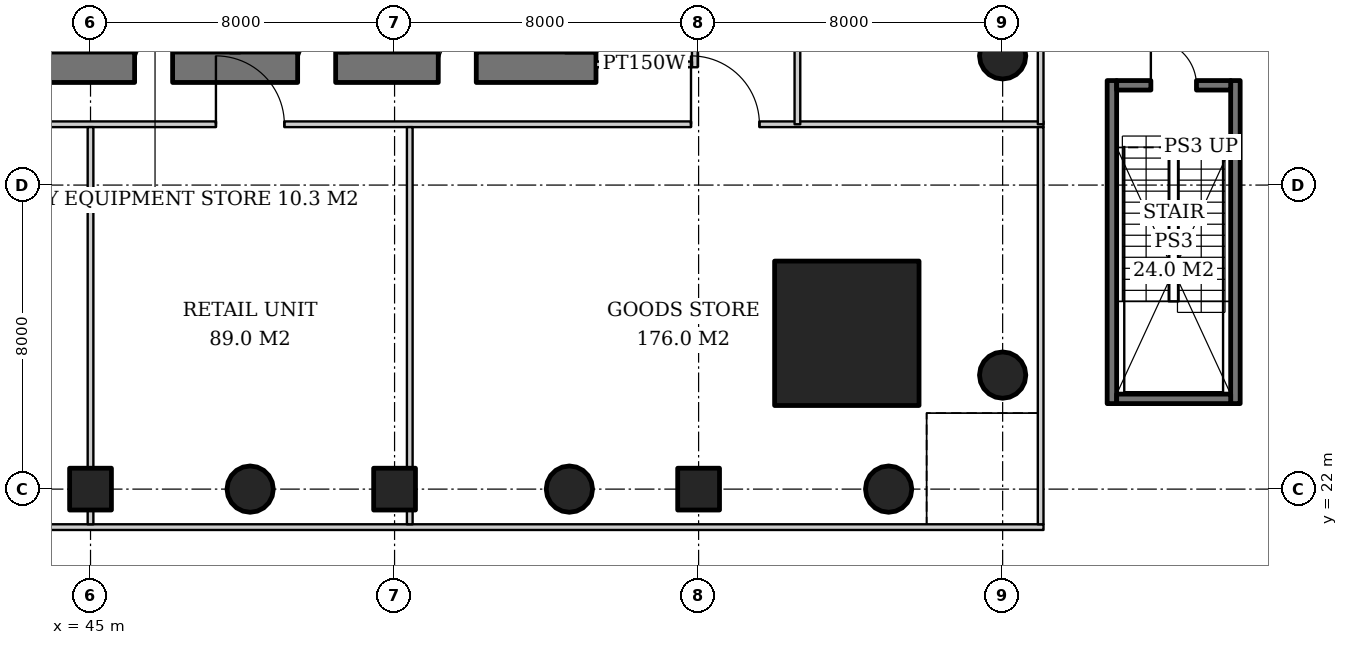
"""IFC4 building model, lengths in metres.
Left out: names, types, materials, properties, quantities, classifications, styles, units other than length and angle.
Written with IfcOpenShell. Run it as: python <this file> out.ifc"""

import sys

from ifc_helpers import new_model, si_unit, direction, frame, frame_2d, origin, origin_2d, place, context, subcontext, project, spatial, rectangle, hollow_circle, extrude, element, fill, save


model = new_model("IFC4")
c1 = context("Model", 3, precision=1e-05, world=origin(), true_north=direction((0.0, 1.0)))
c2 = subcontext(c1, "Body", "Model", "MODEL_VIEW")
j1 = project(units=[si_unit("LENGTHUNIT", "METRE"), si_unit("PLANEANGLEUNIT", "RADIAN")], contexts=[c1])
p1 = place(None, origin())
s1 = spatial("IfcSite", under=j1, at=p1, CompositionType="ELEMENT")
p2 = place(p1, origin())
s2 = spatial("IfcBuilding", under=s1, at=p2, CompositionType="ELEMENT")
p3 = place(p2, frame((0.0, 0.0, 6.0)))
s3 = spatial("IfcBuildingStorey", under=s2, at=p3, CompositionType="ELEMENT", Elevation=6.0)
for number, where, z_axis, x_axis in (
    (1, (69.0, 25.0, 0.0), (0.0, 0.0, 1.0), (1.0, 0.0, 0.0)),
    (2, (69.0, 33.4, 0.0), (0.0, 0.0, 1.0), (1.0, 0.0, 0.0)),
):
    element("IfcColumn", number, at=place(p3, frame(where, z_axis=z_axis, x_axis=x_axis)), inside=s3, PredefinedType="COLUMN", context=c2, shape_type="SweptSolid", body=[
        extrude(hollow_circle(Radius=0.61, WallThickness=0.04, at=origin_2d()), origin(), (0.0, 0.0, 1.0), 5.0),
    ])
p4 = place(p3, frame((64.9, 26.1, 0.0), z_axis=(0.0, 0.0, 1.0), x_axis=(1.0, 0.0, 0.0)))
e3 = element("IfcColumn", 3, at=p4, inside=s3, PredefinedType="COLUMN", context=c2, shape_type="SweptSolid", body=[
    extrude(rectangle(XDim=3.8, YDim=3.8, at=origin_2d()), origin(), (0.0, 0.0, 1.0), 5.0),
])
for number, where, z_axis, x_axis in (
    (4, (66.0, 22.0, 0.0), (0.0, 0.0, 1.0), (1.0, 0.0, 0.0)),
    (5, (49.2, 22.0, 0.0), (0.0, 0.0, 1.0), (1.0, 0.0, 0.0)),
    (6, (57.6, 22.0, 0.0), (0.0, 0.0, 1.0), (1.0, 0.0, 0.0)),
):
    element("IfcColumn", number, at=place(p3, frame(where, z_axis=z_axis, x_axis=x_axis)), inside=s3, PredefinedType="COLUMN", context=c2, shape_type="SweptSolid", body=[
        extrude(hollow_circle(Radius=0.61, WallThickness=0.04, at=origin_2d()), origin(), (0.0, 0.0, 1.0), 5.0),
    ])
p5 = place(p3, frame((31.7, 33.1, 0.0), z_axis=(0.0, 0.0, 1.0), x_axis=(1.0, 0.0, 0.0)))
e7 = element("IfcWall", 7, at=p5, inside=s3, PredefinedType="SHEAR", context=c2, shape_type="SweptSolid", body=[
    extrude(rectangle(XDim=26.6, YDim=0.8, at=frame_2d((13.3, 0.0))), origin(), (0.0, 0.0, 1.0), 5.0),
])
p6 = place(p5, frame((7.3, 0.0, 0.0)))
e8 = element("IfcOpeningElement", 8, at=p6, cuts=e7, PredefinedType="OPENING", context=c2, shape_type="SweptSolid", body=[
    extrude(rectangle(XDim=1.0, YDim=2.1, at=frame_2d((0.5, 1.05))), frame((0.0, 0.41, 0.0), z_axis=(0.0, -1.0, 0.0), x_axis=(1.0, 0.0, 0.0)), (0.0, 0.0, 1.0), 0.82),
])
p7 = place(p5, frame((18.75, 0.0, 0.0)))
e9 = element("IfcOpeningElement", 9, at=p7, cuts=e7, PredefinedType="OPENING", context=c2, shape_type="SweptSolid", body=[
    extrude(rectangle(XDim=1.0, YDim=2.1, at=frame_2d((0.5, 1.05))), frame((0.0, 0.41, 0.0), z_axis=(0.0, -1.0, 0.0), x_axis=(1.0, 0.0, 0.0)), (0.0, 0.0, 1.0), 0.82),
])
p8 = place(p5, frame((3.25, 0.0, 0.0)))
e10 = element("IfcOpeningElement", 10, at=p8, cuts=e7, PredefinedType="OPENING", context=c2, shape_type="SweptSolid", body=[
    extrude(rectangle(XDim=1.0, YDim=2.1, at=frame_2d((0.5, 1.05))), frame((0.0, 0.41, 0.0), z_axis=(0.0, -1.0, 0.0), x_axis=(1.0, 0.0, 0.0)), (0.0, 0.0, 1.0), 0.82),
])
p9 = place(p5, frame((10.42, 0.0, 0.0)))
e11 = element("IfcOpeningElement", 11, at=p9, cuts=e7, PredefinedType="OPENING", context=c2, shape_type="SweptSolid", body=[
    extrude(rectangle(XDim=1.0, YDim=2.1, at=frame_2d((0.5, 1.05))), frame((0.0, 0.41, 0.0), z_axis=(0.0, -1.0, 0.0), x_axis=(1.0, 0.0, 0.0)), (0.0, 0.0, 1.0), 0.82),
])
p10 = place(p5, frame((14.46, 0.0, 0.0)))
e12 = element("IfcOpeningElement", 12, at=p10, cuts=e7, PredefinedType="OPENING", context=c2, shape_type="SweptSolid", body=[
    extrude(rectangle(XDim=1.0, YDim=2.1, at=frame_2d((0.5, 1.05))), frame((0.0, 0.41, 0.0), z_axis=(0.0, -1.0, 0.0), x_axis=(1.0, 0.0, 0.0)), (0.0, 0.0, 1.0), 0.82),
])
p11 = place(p5, frame((22.45, 0.0, 0.0)))
e13 = element("IfcOpeningElement", 13, at=p11, cuts=e7, PredefinedType="OPENING", context=c2, shape_type="SweptSolid", body=[
    extrude(rectangle(XDim=1.0, YDim=2.1, at=frame_2d((0.5, 1.05))), frame((0.0, 0.41, 0.0), z_axis=(0.0, -1.0, 0.0), x_axis=(1.0, 0.0, 0.0)), (0.0, 0.0, 1.0), 0.82),
])
for number, where, z_axis, x_axis in (
    (14, (45.0, 22.0, 0.0), (0.0, 0.0, 1.0), (1.0, 0.0, 0.0)),
    (15, (53.0, 22.0, 0.0), (0.0, 0.0, 1.0), (1.0, 0.0, 0.0)),
    (16, (61.0, 22.0, 0.0), (0.0, 0.0, 1.0), (1.0, 0.0, 0.0)),
):
    element("IfcColumn", number, at=place(p3, frame(where, z_axis=z_axis, x_axis=x_axis)), inside=s3, PredefinedType="COLUMN", context=c2, shape_type="SweptSolid", body=[
        extrude(rectangle(XDim=1.1, YDim=1.1, at=origin_2d()), origin(), (0.0, 0.0, 1.0), 5.0),
    ])
for number, where, z_axis, x_axis in (
    (17, (71.875, 24.25, 0.0), (0.0, 0.0, 1.0), (0.0, 1.0, 0.0)),
    (18, (75.125, 24.25, 0.0), (0.0, 0.0, 1.0), (0.0, 1.0, 0.0)),
):
    element("IfcWall", number, at=place(p3, frame(where, z_axis=z_axis, x_axis=x_axis)), inside=s3, PredefinedType="SOLIDWALL", context=c2, shape_type="SweptSolid", body=[
        extrude(rectangle(XDim=8.5, YDim=0.25, at=frame_2d((4.25, 0.0))), origin(), (0.0, 0.0, 1.0), 4.7),
    ])
p12 = place(p3, frame((72.0, 24.375, 0.0), z_axis=(0.0, 0.0, 1.0), x_axis=(1.0, 0.0, 0.0)))
e19 = element("IfcWall", 19, at=p12, inside=s3, PredefinedType="SOLIDWALL", context=c2, shape_type="SweptSolid", body=[
    extrude(rectangle(XDim=3.0, YDim=0.25, at=frame_2d((1.5, 0.0))), origin(), (0.0, 0.0, 1.0), 4.7),
])
p13 = place(p3, frame((72.0, 32.625, 0.0), z_axis=(0.0, 0.0, 1.0), x_axis=(1.0, 0.0, 0.0)))
e20 = element("IfcWall", 20, at=p13, inside=s3, PredefinedType="SOLIDWALL", context=c2, shape_type="SweptSolid", body=[
    extrude(rectangle(XDim=3.0, YDim=0.25, at=frame_2d((1.5, 0.0))), origin(), (0.0, 0.0, 1.0), 4.7),
])
p14 = place(p13, frame((0.9, 0.0, 0.0)))
e21 = element("IfcOpeningElement", 21, at=p14, cuts=e20, PredefinedType="OPENING", context=c2, shape_type="SweptSolid", body=[
    extrude(rectangle(XDim=1.2, YDim=2.1, at=frame_2d((0.6, 1.05))), frame((0.0, 0.135, 0.0), z_axis=(0.0, -1.0, 0.0), x_axis=(1.0, 0.0, 0.0)), (0.0, 0.0, 1.0), 0.27),
])
p15 = place(p3, frame((60.9, 33.1, 0.0), z_axis=(0.0, 0.0, 1.0), x_axis=(0.0, 1.0, 0.0)))
e22 = element("IfcWall", 22, at=p15, inside=s3, PredefinedType="PARTITIONING", context=c2, shape_type="SweptSolid", body=[
    extrude(rectangle(XDim=10.8, YDim=0.15, at=frame_2d((5.4, 0.0))), origin(), (0.0, 0.0, 1.0), 3.688),
])
p16 = place(p15, frame((1.738, 0.0, 0.0)))
e23 = element("IfcOpeningElement", 23, at=p16, cuts=e22, PredefinedType="OPENING", context=c2, shape_type="SweptSolid", body=[
    extrude(rectangle(XDim=0.8, YDim=2.1, at=frame_2d((0.4, 1.05))), frame((0.0, 0.085, 0.0), z_axis=(0.0, -1.0, 0.0), x_axis=(1.0, 0.0, 0.0)), (0.0, 0.0, 1.0), 0.17),
])
p17 = place(p15, frame((4.9, 0.0, 0.0)))
e24 = element("IfcOpeningElement", 24, at=p17, cuts=e22, PredefinedType="OPENING", context=c2, shape_type="SweptSolid", body=[
    extrude(rectangle(XDim=1.0, YDim=2.1, at=frame_2d((0.5, 1.05))), frame((0.0, 0.085, 0.0), z_axis=(0.0, -1.0, 0.0), x_axis=(1.0, 0.0, 0.0)), (0.0, 0.0, 1.0), 0.17),
])
p18 = place(p15, frame((8.262, 0.0, 0.0)))
e25 = element("IfcOpeningElement", 25, at=p18, cuts=e22, PredefinedType="OPENING", context=c2, shape_type="SweptSolid", body=[
    extrude(rectangle(XDim=0.8, YDim=2.1, at=frame_2d((0.4, 1.05))), frame((0.0, 0.085, 0.0), z_axis=(0.0, -1.0, 0.0), x_axis=(1.0, 0.0, 0.0)), (0.0, 0.0, 1.0), 0.17),
])
p19 = place(p3, frame((60.825, 33.175, 0.0), z_axis=(0.0, 0.0, 1.0), x_axis=(-1.0, 0.0, 0.0)))
e26 = element("IfcWall", 26, at=p19, inside=s3, PredefinedType="PARTITIONING", context=c2, shape_type="SweptSolid", body=[
    extrude(rectangle(XDim=2.525, YDim=0.15, at=frame_2d((1.262, 0.0))), origin(), (0.0, 0.0, 1.0), 3.688),
])
p20 = place(p3, frame((19.925, 21.0, 0.0), z_axis=(0.0, 0.0, 1.0), x_axis=(1.0, 0.0, 0.0)))
e27 = element("IfcWall", 27, at=p20, inside=s3, PredefinedType="PARTITIONING", context=c2, shape_type="SweptSolid", body=[
    extrude(rectangle(XDim=50.15, YDim=0.15, at=frame_2d((25.075, 0.0))), origin(), (0.0, 0.0, 1.0), 3.2),
])
p21 = place(p3, frame((19.925, 31.6, 0.0), z_axis=(0.0, 0.0, 1.0), x_axis=(1.0, 0.0, 0.0)))
e28 = element("IfcWall", 28, at=p21, inside=s3, PredefinedType="PARTITIONING", context=c2, shape_type="SweptSolid", body=[
    extrude(rectangle(XDim=50.15, YDim=0.15, at=frame_2d((25.075, 0.0))), origin(), (0.0, 0.0, 1.0), 3.688),
])
p22 = place(p21, frame((7.475, 0.0, 0.0)))
e29 = element("IfcOpeningElement", 29, at=p22, cuts=e28, PredefinedType="OPENING", context=c2, shape_type="SweptSolid", body=[
    extrude(rectangle(XDim=1.8, YDim=2.4, at=frame_2d((0.9, 1.2))), frame((0.0, 0.085, 0.0), z_axis=(0.0, -1.0, 0.0), x_axis=(1.0, 0.0, 0.0)), (0.0, 0.0, 1.0), 0.17),
])
p23 = place(p21, frame((19.975, 0.0, 0.0)))
e30 = element("IfcOpeningElement", 30, at=p23, cuts=e28, PredefinedType="OPENING", context=c2, shape_type="SweptSolid", body=[
    extrude(rectangle(XDim=1.8, YDim=2.4, at=frame_2d((0.9, 1.2))), frame((0.0, 0.085, 0.0), z_axis=(0.0, -1.0, 0.0), x_axis=(1.0, 0.0, 0.0)), (0.0, 0.0, 1.0), 0.17),
])
p24 = place(p21, frame((28.375, 0.0, 0.0)))
e31 = element("IfcOpeningElement", 31, at=p24, cuts=e28, PredefinedType="OPENING", context=c2, shape_type="SweptSolid", body=[
    extrude(rectangle(XDim=1.8, YDim=2.4, at=frame_2d((0.9, 1.2))), frame((0.0, 0.085, 0.0), z_axis=(0.0, -1.0, 0.0), x_axis=(1.0, 0.0, 0.0)), (0.0, 0.0, 1.0), 0.17),
])
p25 = place(p21, frame((40.875, 0.0, 0.0)))
e32 = element("IfcOpeningElement", 32, at=p25, cuts=e28, PredefinedType="OPENING", context=c2, shape_type="SweptSolid", body=[
    extrude(rectangle(XDim=1.8, YDim=2.4, at=frame_2d((0.9, 1.2))), frame((0.0, 0.085, 0.0), z_axis=(0.0, -1.0, 0.0), x_axis=(1.0, 0.0, 0.0)), (0.0, 0.0, 1.0), 0.17),
])
p26 = place(p3, frame((70.0, 21.075, 0.0), z_axis=(0.0, 0.0, 1.0), x_axis=(0.0, 1.0, 0.0)))
e33 = element("IfcWall", 33, at=p26, inside=s3, PredefinedType="PARTITIONING", context=c2, shape_type="SweptSolid", body=[
    extrude(rectangle(XDim=10.45, YDim=0.15, at=frame_2d((5.225, 0.0))), origin(), (0.0, 0.0, 1.0), 4.7),
])
p27 = place(p3, frame((45.0, 21.075, 0.0), z_axis=(0.0, 0.0, 1.0), x_axis=(0.0, 1.0, 0.0)))
e34 = element("IfcWall", 34, at=p27, inside=s3, PredefinedType="PARTITIONING", context=c2, shape_type="SweptSolid", body=[
    extrude(rectangle(XDim=0.375, YDim=0.15, at=frame_2d((0.188, 0.0))), origin(), (0.0, 0.0, 1.0), 3.2),
])
p28 = place(p3, frame((45.0, 22.55, 0.0), z_axis=(0.0, 0.0, 1.0), x_axis=(0.0, 1.0, 0.0)))
e35 = element("IfcWall", 35, at=p28, inside=s3, PredefinedType="PARTITIONING", context=c2, shape_type="SweptSolid", body=[
    extrude(rectangle(XDim=8.975, YDim=0.15, at=frame_2d((4.487, 0.0))), origin(), (0.0, 0.0, 1.0), 4.7),
])
p29 = place(p3, frame((53.4, 21.075, 0.0), z_axis=(0.0, 0.0, 1.0), x_axis=(0.0, 1.0, 0.0)))
e36 = element("IfcWall", 36, at=p29, inside=s3, PredefinedType="PARTITIONING", context=c2, shape_type="SweptSolid", body=[
    extrude(rectangle(XDim=0.375, YDim=0.15, at=frame_2d((0.188, 0.0))), origin(), (0.0, 0.0, 1.0), 3.2),
])
p30 = place(p3, frame((53.4, 22.55, 0.0), z_axis=(0.0, 0.0, 1.0), x_axis=(0.0, 1.0, 0.0)))
e37 = element("IfcWall", 37, at=p30, inside=s3, PredefinedType="PARTITIONING", context=c2, shape_type="SweptSolid", body=[
    extrude(rectangle(XDim=8.975, YDim=0.15, at=frame_2d((4.487, 0.0))), origin(), (0.0, 0.0, 1.0), 4.7),
])
p31 = place(p3, frame((63.6, 31.6, 0.0), z_axis=(0.0, 0.0, 1.0), x_axis=(0.0, 1.0, 0.0)))
e38 = element("IfcWall", 38, at=p31, inside=s3, PredefinedType="PARTITIONING", context=c2, shape_type="SweptSolid", body=[
    extrude(rectangle(XDim=28.8, YDim=0.15, at=frame_2d((14.4, 0.0))), origin(), (0.0, 0.0, 1.0), 3.688),
])
p32 = place(p31, frame((6.3, 0.0, 0.0)))
e39 = element("IfcOpeningElement", 39, at=p32, cuts=e38, PredefinedType="OPENING", context=c2, shape_type="SweptSolid", body=[
    extrude(rectangle(XDim=1.8, YDim=2.4, at=frame_2d((0.9, 1.2))), frame((0.0, 0.085, 0.0), z_axis=(0.0, -1.0, 0.0), x_axis=(1.0, 0.0, 0.0)), (0.0, 0.0, 1.0), 0.17),
])
p33 = place(p31, frame((20.7, 0.0, 0.0)))
e40 = element("IfcOpeningElement", 40, at=p33, cuts=e38, PredefinedType="OPENING", context=c2, shape_type="SweptSolid", body=[
    extrude(rectangle(XDim=1.8, YDim=2.4, at=frame_2d((0.9, 1.2))), frame((0.0, 0.085, 0.0), z_axis=(0.0, -1.0, 0.0), x_axis=(1.0, 0.0, 0.0)), (0.0, 0.0, 1.0), 0.17),
])
p34 = place(p3, frame((70.0, 31.6, 0.0), z_axis=(0.0, 0.0, 1.0), x_axis=(0.0, 1.0, 0.0)))
e41 = element("IfcWall", 41, at=p34, inside=s3, PredefinedType="PARTITIONING", context=c2, shape_type="SweptSolid", body=[
    extrude(rectangle(XDim=28.8, YDim=0.15, at=frame_2d((14.4, 0.0))), origin(), (0.0, 0.0, 1.0), 4.7),
])
p35 = place(p7, origin())
e42 = element("IfcDoor", 42, at=p35, inside=s3, OperationType="SINGLE_SWING_RIGHT", PredefinedType="DOOR", context=c2, shape_type="SweptSolid", body=[
    extrude(rectangle(XDim=1.0, YDim=2.1, at=frame_2d((0.5, 1.05))), frame((0.0, 0.025, 0.0), z_axis=(0.0, -1.0, 0.0), x_axis=(1.0, 0.0, 0.0)), (0.0, 0.0, 1.0), 0.05),
])
fill(e9, e42)
p36 = place(p10, origin())
e43 = element("IfcDoor", 43, at=p36, inside=s3, OperationType="SINGLE_SWING_RIGHT", PredefinedType="DOOR", context=c2, shape_type="SweptSolid", body=[
    extrude(rectangle(XDim=1.0, YDim=2.1, at=frame_2d((0.5, 1.05))), frame((0.0, 0.39, 0.0), z_axis=(0.0, -1.0, 0.0), x_axis=(1.0, 0.0, 0.0)), (0.0, 0.0, 1.0), 0.05),
])
fill(e12, e43)
p37 = place(p11, origin())
e44 = element("IfcDoor", 44, at=p37, inside=s3, OperationType="SINGLE_SWING_RIGHT", PredefinedType="DOOR", context=c2, shape_type="SweptSolid", body=[
    extrude(rectangle(XDim=1.0, YDim=2.1, at=frame_2d((0.5, 1.05))), frame((0.0, 0.39, 0.0), z_axis=(0.0, -1.0, 0.0), x_axis=(1.0, 0.0, 0.0)), (0.0, 0.0, 1.0), 0.05),
])
fill(e13, e44)
p38 = place(p14, origin())
e45 = element("IfcDoor", 45, at=p38, inside=s3, OperationType="SINGLE_SWING_LEFT", PredefinedType="DOOR", context=c2, shape_type="SweptSolid", body=[
    extrude(rectangle(XDim=1.2, YDim=2.1, at=frame_2d((0.6, 1.05))), frame((0.0, 0.025, 0.0), z_axis=(0.0, -1.0, 0.0), x_axis=(1.0, 0.0, 0.0)), (0.0, 0.0, 1.0), 0.05),
])
fill(e21, e45)
p39 = place(p24, origin())
e46 = element("IfcDoor", 46, at=p39, inside=s3, OperationType="DOUBLE_DOOR_SINGLE_SWING", PredefinedType="DOOR", context=c2, shape_type="SweptSolid", body=[
    extrude(rectangle(XDim=1.8, YDim=2.4, at=frame_2d((0.9, 1.2))), frame((0.0, 0.025, 0.0), z_axis=(0.0, -1.0, 0.0), x_axis=(1.0, 0.0, 0.0)), (0.0, 0.0, 1.0), 0.05),
])
fill(e31, e46)
p40 = place(p25, origin())
e47 = element("IfcDoor", 47, at=p40, inside=s3, OperationType="DOUBLE_DOOR_SINGLE_SWING", PredefinedType="DOOR", context=c2, shape_type="SweptSolid", body=[
    extrude(rectangle(XDim=1.8, YDim=2.4, at=frame_2d((0.9, 1.2))), frame((0.0, 0.025, 0.0), z_axis=(0.0, -1.0, 0.0), x_axis=(1.0, 0.0, 0.0)), (0.0, 0.0, 1.0), 0.05),
])
fill(e32, e47)
save(model, sys.argv[1])
